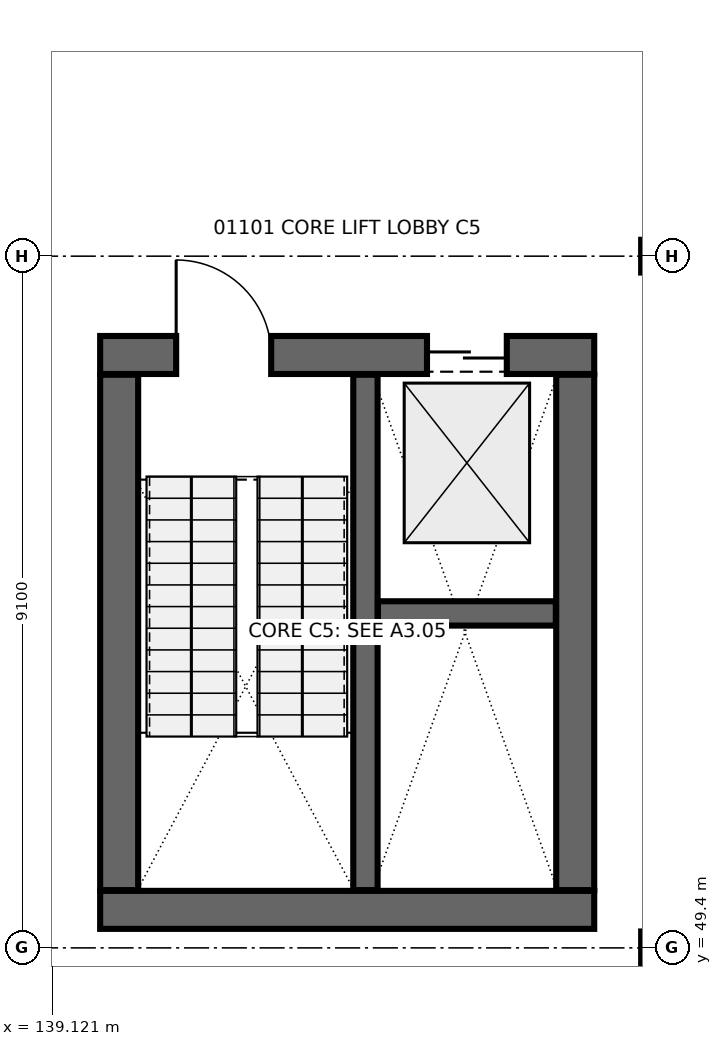
"""IFC4 building model, lengths in metres.
Left out: names, types, materials, properties, quantities, classifications, styles, units other than length and angle.
Written with IfcOpenShell. Run it as: python <this file> out.ifc"""

import sys

from ifc_helpers import new_model, si_unit, direction, frame, frame_2d, origin, origin_2d, place, context, subcontext, project, spatial, rectangle, i_section, extrude, element, fill, save


model = new_model("IFC4")
c1 = context("Model", 3, precision=1e-05, world=origin(), true_north=direction((0.0, 1.0)))
c2 = subcontext(c1, "Body", "Model", "MODEL_VIEW")
j1 = project(units=[si_unit("LENGTHUNIT", "METRE"), si_unit("PLANEANGLEUNIT", "RADIAN")], contexts=[c1])
p1 = place(None, origin())
s1 = spatial("IfcSite", under=j1, at=p1, CompositionType="ELEMENT")
p2 = place(p1, origin())
s2 = spatial("IfcBuilding", under=s1, at=p2, CompositionType="ELEMENT")
p3 = place(p2, frame((0.0, 0.0, 5.1)))
s3 = spatial("IfcBuildingStorey", under=s2, at=p3, CompositionType="ELEMENT", Elevation=5.1)
for number, where, z_axis, x_axis in (
    (1, (147.0, 49.4, 0.0), (0.0, 0.0, 1.0), (1.0, 0.0, 0.0)),
    (2, (147.0, 58.5, 0.0), (0.0, 0.0, 1.0), (1.0, 0.0, 0.0)),
):
    element("IfcColumn", number, at=place(p3, frame(where, z_axis=z_axis, x_axis=x_axis)), inside=s3, PredefinedType="COLUMN", context=c2, shape_type="SweptSolid", body=[
        extrude(i_section(OverallWidth=0.265, OverallDepth=0.431, WebThickness=0.015, FlangeThickness=0.025, at=origin_2d()), origin(), (0.0, 0.0, 1.0), 4.5),
    ])
p4 = place(p3, frame((139.75, 49.9, 0.0), z_axis=(0.0, 0.0, 1.0), x_axis=(1.0, 0.0, 0.0)))
e3 = element("IfcWall", 3, at=p4, inside=s3, PredefinedType="SHEAR", context=c2, shape_type="SweptSolid", body=[
    extrude(rectangle(XDim=6.5, YDim=0.5, at=frame_2d((3.25, 0.0))), origin(), (0.0, 0.0, 1.0), 4.22),
])
p5 = place(p3, frame((139.75, 57.2, 0.0), z_axis=(0.0, 0.0, 1.0), x_axis=(1.0, 0.0, 0.0)))
e4 = element("IfcWall", 4, at=p5, inside=s3, PredefinedType="SHEAR", context=c2, shape_type="SweptSolid", body=[
    extrude(rectangle(XDim=6.5, YDim=0.5, at=frame_2d((3.25, 0.0))), origin(), (0.0, 0.0, 1.0), 4.22),
])
p6 = place(p5, frame((1.0, 0.0, 0.0)))
e5 = element("IfcOpeningElement", 5, at=p6, cuts=e4, PredefinedType="OPENING", context=c2, shape_type="SweptSolid", body=[
    extrude(rectangle(XDim=1.25, YDim=2.2, at=frame_2d((0.625, 1.1))), frame((0.0, 0.26, 0.0), z_axis=(0.0, -1.0, 0.0), x_axis=(1.0, 0.0, 0.0)), (0.0, 0.0, 1.0), 0.52),
])
p7 = place(p5, frame((4.3, 0.0, 0.0)))
e6 = element("IfcOpeningElement", 6, at=p7, cuts=e4, PredefinedType="OPENING", context=c2, shape_type="SweptSolid", body=[
    extrude(rectangle(XDim=1.05, YDim=2.15, at=frame_2d((0.525, 1.075))), frame((0.0, 0.26, 0.0), z_axis=(0.0, -1.0, 0.0), x_axis=(1.0, 0.0, 0.0)), (0.0, 0.0, 1.0), 0.52),
])
for number, where, z_axis, x_axis in (
    (7, (140.0, 50.16, 0.0), (0.0, 0.0, 1.0), (0.0, 1.0, 0.0)),
    (8, (146.0, 50.16, 0.0), (0.0, 0.0, 1.0), (0.0, 1.0, 0.0)),
):
    element("IfcWall", number, at=place(p3, frame(where, z_axis=z_axis, x_axis=x_axis)), inside=s3, PredefinedType="SHEAR", context=c2, shape_type="SweptSolid", body=[
        extrude(rectangle(XDim=6.78, YDim=0.5, at=frame_2d((3.39, 0.0))), origin(), (0.0, 0.0, 1.0), 4.22),
    ])
p8 = place(p3, frame((143.24, 50.16, 0.0), z_axis=(0.0, 0.0, 1.0), x_axis=(0.0, 1.0, 0.0)))
e9 = element("IfcWall", 9, at=p8, inside=s3, PredefinedType="SHEAR", context=c2, shape_type="SweptSolid", body=[
    extrude(rectangle(XDim=6.78, YDim=0.32, at=frame_2d((3.39, 0.0))), origin(), (0.0, 0.0, 1.0), 4.22),
])
p9 = place(p3, frame((143.405, 53.8, 0.0), z_axis=(0.0, 0.0, 1.0), x_axis=(1.0, 0.0, 0.0)))
e10 = element("IfcWall", 10, at=p9, inside=s3, PredefinedType="SHEAR", context=c2, shape_type="SweptSolid", body=[
    extrude(rectangle(XDim=2.34, YDim=0.32, at=frame_2d((1.17, 0.0))), origin(), (0.0, 0.0, 1.0), 4.22),
])
p10 = place(p6, origin())
e11 = element("IfcDoor", 11, at=p10, inside=s3, OperationType="SINGLE_SWING_LEFT", PredefinedType="DOOR", context=c2, shape_type="SweptSolid", body=[
    extrude(rectangle(XDim=1.25, YDim=2.2, at=frame_2d((0.625, 1.1))), frame((0.0, 0.025, 0.0), z_axis=(0.0, -1.0, 0.0), x_axis=(1.0, 0.0, 0.0)), (0.0, 0.0, 1.0), 0.05),
])
fill(e5, e11)
p11 = place(p7, origin())
e12 = element("IfcDoor", 12, at=p11, inside=s3, OperationType="DOUBLE_DOOR_SLIDING", PredefinedType="DOOR", context=c2, shape_type="SweptSolid", body=[
    extrude(rectangle(XDim=1.05, YDim=2.15, at=frame_2d((0.525, 1.075))), frame((0.0, 0.025, 0.0), z_axis=(0.0, -1.0, 0.0), x_axis=(1.0, 0.0, 0.0)), (0.0, 0.0, 1.0), 0.05),
])
fill(e6, e12)
save(model, sys.argv[1])
